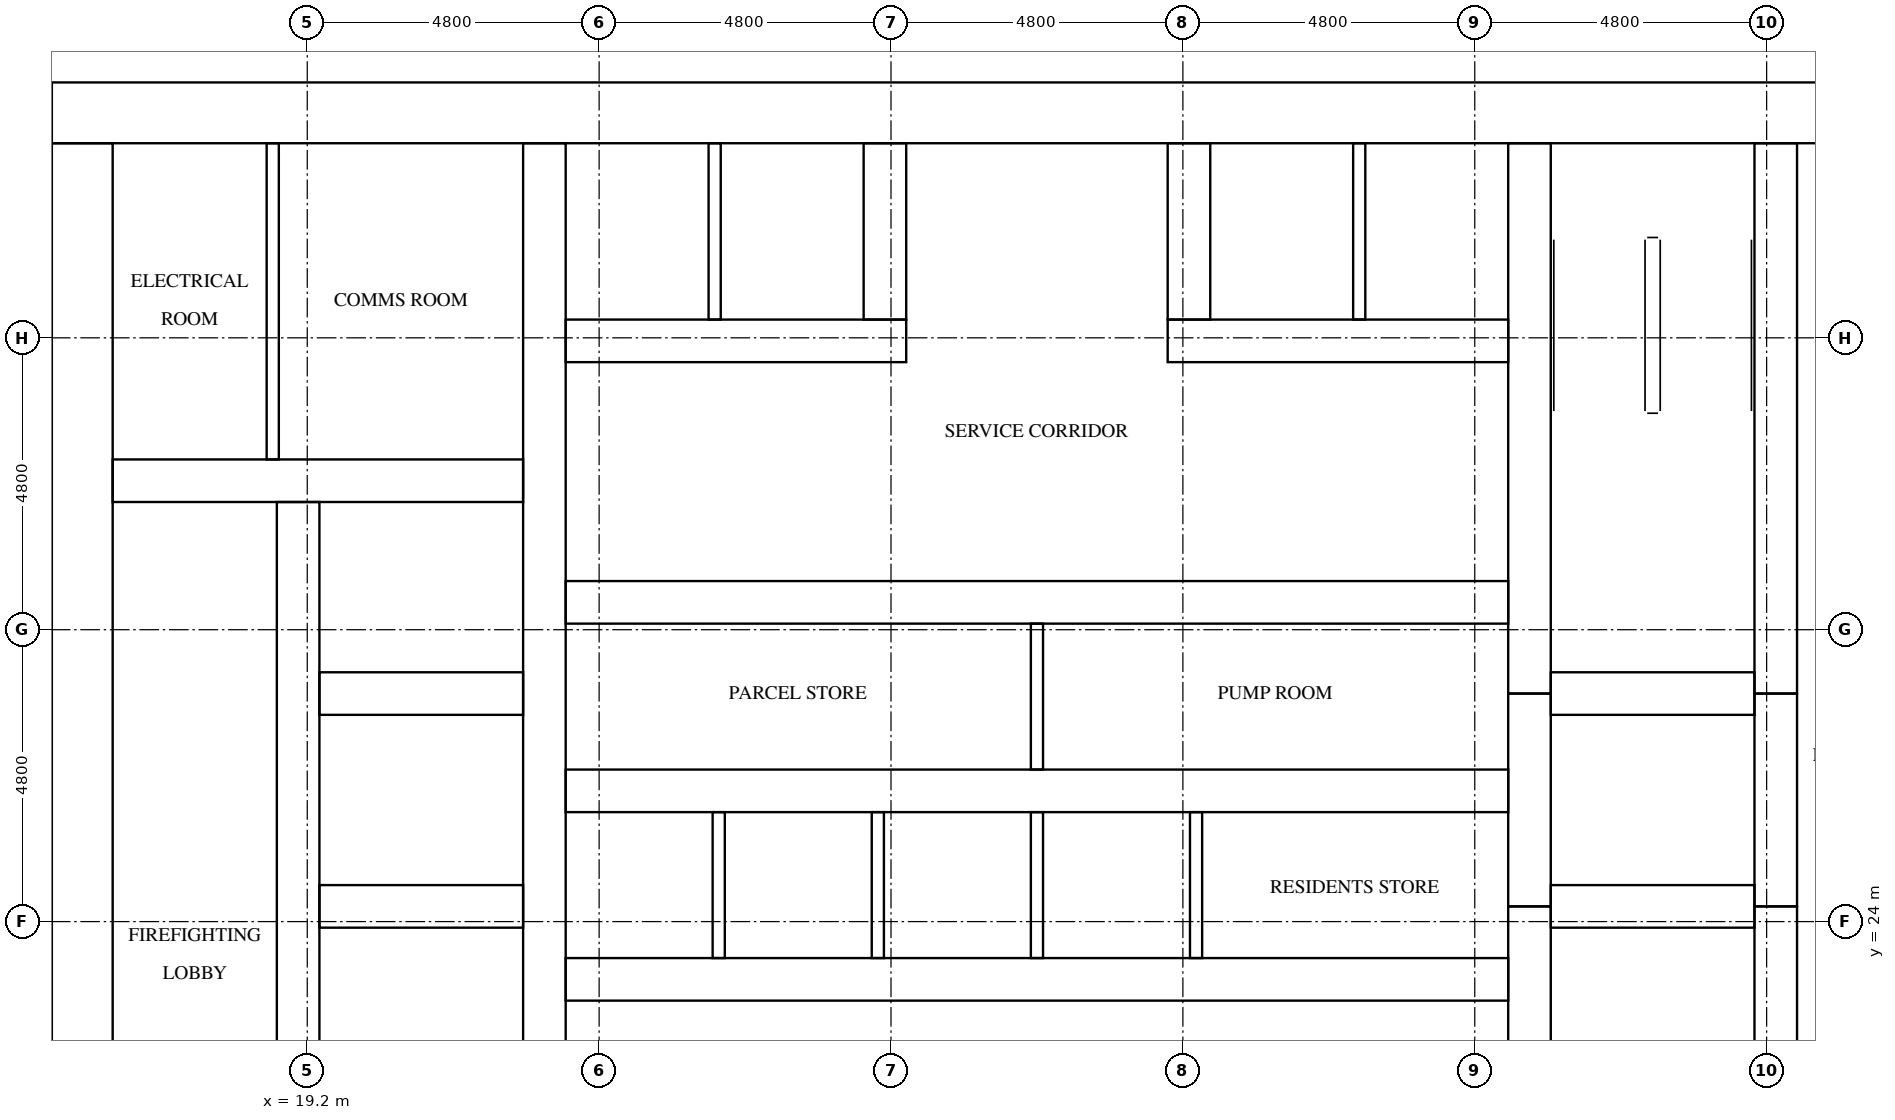
"""IFC4 building model, lengths in metres.
Left out: names, types, materials, properties, quantities, classifications, styles, units other than length and angle.
Written with IfcOpenShell. Run it as: python <this file> out.ifc"""

import sys

from ifc_helpers import new_model, si_unit, direction, frame, frame_2d, origin, place, context, subcontext, project, spatial, rectangle, extrude, element, fill, save


model = new_model("IFC4")
c1 = context("Model", 3, precision=1e-05, world=origin(), true_north=direction((0.0, 1.0)))
c2 = subcontext(c1, "Body", "Model", "MODEL_VIEW")
j1 = project(units=[si_unit("LENGTHUNIT", "METRE"), si_unit("PLANEANGLEUNIT", "RADIAN")], contexts=[c1])
p1 = place(None, origin())
s1 = spatial("IfcSite", under=j1, at=p1, CompositionType="ELEMENT")
p2 = place(p1, origin())
s2 = spatial("IfcBuilding", under=s1, at=p2, CompositionType="ELEMENT")
p3 = place(p2, frame((0.0, 0.0, 50.4)))
s3 = spatial("IfcBuildingStorey", under=s2, at=p3, CompositionType="ELEMENT", Elevation=50.4)
p4 = place(p3, frame((15.0, 37.3, 0.0), z_axis=(0.0, 0.0, 1.0), x_axis=(1.0, 0.0, 0.0)))
e1 = element("IfcWall", 1, at=p4, inside=s3, PredefinedType="SHEAR", context=c2, shape_type="SweptSolid", body=[
    extrude(rectangle(XDim=32.4, YDim=1.0, at=frame_2d((16.2, 0.0))), origin(), (0.0, 0.0, 1.0), 3.1),
])
p5 = place(p4, frame((15.3, 0.0, 0.0)))
e2 = element("IfcOpeningElement", 2, at=p5, cuts=e1, PredefinedType="OPENING", context=c2, shape_type="SweptSolid", body=[
    extrude(rectangle(XDim=1.8, YDim=2.1, at=frame_2d((0.9, 1.05))), frame((0.0, 0.51, 0.0), z_axis=(0.0, -1.0, 0.0), x_axis=(1.0, 0.0, 0.0)), (0.0, 0.0, 1.0), 1.02),
])
p6 = place(p4, frame((1.766, 0.0, 0.0)))
e3 = element("IfcOpeningElement", 3, at=p6, cuts=e1, PredefinedType="OPENING", context=c2, shape_type="SweptSolid", body=[
    extrude(rectangle(XDim=1.0, YDim=2.1, at=frame_2d((0.5, 1.05))), frame((0.0, 0.51, 0.0), z_axis=(0.0, -1.0, 0.0), x_axis=(1.0, 0.0, 0.0)), (0.0, 0.0, 1.0), 1.02),
])
p7 = place(p4, frame((5.241, 0.0, 0.0)))
e4 = element("IfcOpeningElement", 4, at=p7, cuts=e1, PredefinedType="OPENING", context=c2, shape_type="SweptSolid", body=[
    extrude(rectangle(XDim=1.0, YDim=2.1, at=frame_2d((0.5, 1.05))), frame((0.0, 0.51, 0.0), z_axis=(0.0, -1.0, 0.0), x_axis=(1.0, 0.0, 0.0)), (0.0, 0.0, 1.0), 1.02),
])
p8 = place(p3, frame((15.5, 16.0, 0.0), z_axis=(0.0, 0.0, 1.0), x_axis=(0.0, 1.0, 0.0)))
e5 = element("IfcWall", 5, at=p8, inside=s3, PredefinedType="SHEAR", context=c2, shape_type="SweptSolid", body=[
    extrude(rectangle(XDim=20.8, YDim=1.0, at=frame_2d((10.4, 0.0))), origin(), (0.0, 0.0, 1.0), 3.1),
])
p9 = place(p8, frame((4.76, 0.0, 0.0)))
e6 = element("IfcOpeningElement", 6, at=p9, cuts=e5, PredefinedType="OPENING", context=c2, shape_type="SweptSolid", body=[
    extrude(rectangle(XDim=1.2, YDim=2.1, at=frame_2d((0.6, 1.05))), frame((0.0, 0.51, 0.0), z_axis=(0.0, -1.0, 0.0), x_axis=(1.0, 0.0, 0.0)), (0.0, 0.0, 1.0), 1.02),
])
p10 = place(p3, frame((19.05, 16.0, 0.0), z_axis=(0.0, 0.0, 1.0), x_axis=(0.0, 1.0, 0.0)))
e7 = element("IfcWall", 7, at=p10, inside=s3, PredefinedType="SHEAR", context=c2, shape_type="SweptSolid", body=[
    extrude(rectangle(XDim=14.9, YDim=0.7, at=frame_2d((7.45, 0.0))), origin(), (0.0, 0.0, 1.0), 3.1),
])
p11 = place(p10, frame((9.45, 0.0, 0.0)))
e8 = element("IfcOpeningElement", 8, at=p11, cuts=e7, PredefinedType="OPENING", context=c2, shape_type="SweptSolid", body=[
    extrude(rectangle(XDim=1.1, YDim=2.1, at=frame_2d((0.55, 1.05))), frame((0.0, 0.36, 0.0), z_axis=(0.0, -1.0, 0.0), x_axis=(1.0, 0.0, 0.0)), (0.0, 0.0, 1.0), 0.72),
])
p12 = place(p10, frame((12.95, 0.0, 0.0)))
e9 = element("IfcOpeningElement", 9, at=p12, cuts=e7, PredefinedType="OPENING", context=c2, shape_type="SweptSolid", body=[
    extrude(rectangle(XDim=1.1, YDim=2.1, at=frame_2d((0.55, 1.05))), frame((0.0, 0.36, 0.0), z_axis=(0.0, -1.0, 0.0), x_axis=(1.0, 0.0, 0.0)), (0.0, 0.0, 1.0), 0.72),
])
p13 = place(p10, frame((0.2, 0.0, 0.0)))
e10 = element("IfcOpeningElement", 10, at=p13, cuts=e7, PredefinedType="OPENING", context=c2, shape_type="SweptSolid", body=[
    extrude(rectangle(XDim=1.2, YDim=2.1, at=frame_2d((0.6, 1.05))), frame((0.0, 0.36, 0.0), z_axis=(0.0, -1.0, 0.0), x_axis=(1.0, 0.0, 0.0)), (0.0, 0.0, 1.0), 0.72),
])
p14 = place(p3, frame((23.1, 16.0, 0.0), z_axis=(0.0, 0.0, 1.0), x_axis=(0.0, 1.0, 0.0)))
e11 = element("IfcWall", 11, at=p14, inside=s3, PredefinedType="SHEAR", context=c2, shape_type="SweptSolid", body=[
    extrude(rectangle(XDim=20.8, YDim=0.7, at=frame_2d((10.4, 0.0))), origin(), (0.0, 0.0, 1.0), 3.1),
])
p15 = place(p3, frame((39.3, 16.0, 0.0), z_axis=(0.0, 0.0, 1.0), x_axis=(0.0, 1.0, 0.0)))
e12 = element("IfcWall", 12, at=p15, inside=s3, PredefinedType="SHEAR", context=c2, shape_type="SweptSolid", body=[
    extrude(rectangle(XDim=8.25, YDim=0.7, at=frame_2d((4.125, 0.0))), origin(), (0.0, 0.0, 1.0), 3.1),
])
p16 = place(p3, frame((39.3, 24.25, 0.0), z_axis=(0.0, 0.0, 1.0), x_axis=(0.0, 1.0, 0.0)))
e13 = element("IfcWall", 13, at=p16, inside=s3, PredefinedType="SHEAR", context=c2, shape_type="SweptSolid", body=[
    extrude(rectangle(XDim=3.5, YDim=0.7, at=frame_2d((1.75, 0.0))), origin(), (0.0, 0.0, 1.0), 3.1),
])
p17 = place(p3, frame((39.3, 27.75, 0.0), z_axis=(0.0, 0.0, 1.0), x_axis=(0.0, 1.0, 0.0)))
e14 = element("IfcWall", 14, at=p17, inside=s3, PredefinedType="SHEAR", context=c2, shape_type="SweptSolid", body=[
    extrude(rectangle(XDim=9.05, YDim=0.7, at=frame_2d((4.525, 0.0))), origin(), (0.0, 0.0, 1.0), 3.1),
])
p18 = place(p3, frame((43.35, 16.0, 0.0), z_axis=(0.0, 0.0, 1.0), x_axis=(0.0, 1.0, 0.0)))
e15 = element("IfcWall", 15, at=p18, inside=s3, PredefinedType="SHEAR", context=c2, shape_type="SweptSolid", body=[
    extrude(rectangle(XDim=8.25, YDim=0.7, at=frame_2d((4.125, 0.0))), origin(), (0.0, 0.0, 1.0), 3.1),
])
p19 = place(p18, frame((0.2, 0.0, 0.0)))
e16 = element("IfcOpeningElement", 16, at=p19, cuts=e15, PredefinedType="OPENING", context=c2, shape_type="SweptSolid", body=[
    extrude(rectangle(XDim=1.2, YDim=2.1, at=frame_2d((0.6, 1.05))), frame((0.0, 0.36, 0.0), z_axis=(0.0, -1.0, 0.0), x_axis=(1.0, 0.0, 0.0)), (0.0, 0.0, 1.0), 0.72),
])
p20 = place(p3, frame((43.35, 24.25, 0.0), z_axis=(0.0, 0.0, 1.0), x_axis=(0.0, 1.0, 0.0)))
e17 = element("IfcWall", 17, at=p20, inside=s3, PredefinedType="SHEAR", context=c2, shape_type="SweptSolid", body=[
    extrude(rectangle(XDim=3.5, YDim=0.7, at=frame_2d((1.75, 0.0))), origin(), (0.0, 0.0, 1.0), 3.1),
])
p21 = place(p20, frame((1.2, 0.0, 0.0)))
e18 = element("IfcOpeningElement", 18, at=p21, cuts=e17, PredefinedType="OPENING", context=c2, shape_type="SweptSolid", body=[
    extrude(rectangle(XDim=1.1, YDim=2.1, at=frame_2d((0.55, 1.05))), frame((0.0, 0.36, 0.0), z_axis=(0.0, -1.0, 0.0), x_axis=(1.0, 0.0, 0.0)), (0.0, 0.0, 1.0), 0.72),
])
p22 = place(p3, frame((43.35, 27.75, 0.0), z_axis=(0.0, 0.0, 1.0), x_axis=(0.0, 1.0, 0.0)))
e19 = element("IfcWall", 19, at=p22, inside=s3, PredefinedType="SHEAR", context=c2, shape_type="SweptSolid", body=[
    extrude(rectangle(XDim=9.05, YDim=0.7, at=frame_2d((4.525, 0.0))), origin(), (0.0, 0.0, 1.0), 3.1),
])
p23 = place(p22, frame((7.65, 0.0, 0.0)))
e20 = element("IfcOpeningElement", 20, at=p23, cuts=e19, PredefinedType="OPENING", context=c2, shape_type="SweptSolid", body=[
    extrude(rectangle(XDim=1.2, YDim=2.1, at=frame_2d((0.6, 1.05))), frame((0.0, 0.36, 0.0), z_axis=(0.0, -1.0, 0.0), x_axis=(1.0, 0.0, 0.0)), (0.0, 0.0, 1.0), 0.72),
])
for number, where, z_axis, x_axis in (
    (21, (19.4, 24.25, 0.0), (0.0, 0.0, 1.0), (1.0, 0.0, 0.0)),
    (22, (19.4, 27.75, 0.0), (0.0, 0.0, 1.0), (1.0, 0.0, 0.0)),
):
    element("IfcWall", number, at=place(p3, frame(where, z_axis=z_axis, x_axis=x_axis)), inside=s3, PredefinedType="SHEAR", context=c2, shape_type="SweptSolid", body=[
        extrude(rectangle(XDim=3.35, YDim=0.7, at=frame_2d((1.675, 0.0))), origin(), (0.0, 0.0, 1.0), 3.1),
    ])
p24 = place(p3, frame((16.0, 31.25, 0.0), z_axis=(0.0, 0.0, 1.0), x_axis=(1.0, 0.0, 0.0)))
e23 = element("IfcWall", 23, at=p24, inside=s3, PredefinedType="SHEAR", context=c2, shape_type="SweptSolid", body=[
    extrude(rectangle(XDim=6.75, YDim=0.7, at=frame_2d((3.375, 0.0))), origin(), (0.0, 0.0, 1.0), 3.1),
])
for number, where, z_axis, x_axis in (
    (24, (39.65, 24.25, 0.0), (0.0, 0.0, 1.0), (1.0, 0.0, 0.0)),
    (25, (39.65, 27.75, 0.0), (0.0, 0.0, 1.0), (1.0, 0.0, 0.0)),
):
    element("IfcWall", number, at=place(p3, frame(where, z_axis=z_axis, x_axis=x_axis)), inside=s3, PredefinedType="SHEAR", context=c2, shape_type="SweptSolid", body=[
        extrude(rectangle(XDim=3.35, YDim=0.7, at=frame_2d((1.675, 0.0))), origin(), (0.0, 0.0, 1.0), 3.1),
    ])
p25 = place(p3, frame((23.45, 23.05, 0.0), z_axis=(0.0, 0.0, 1.0), x_axis=(1.0, 0.0, 0.0)))
e26 = element("IfcWall", 26, at=p25, inside=s3, PredefinedType="SHEAR", context=c2, shape_type="SweptSolid", body=[
    extrude(rectangle(XDim=15.5, YDim=0.7, at=frame_2d((7.75, 0.0))), origin(), (0.0, 0.0, 1.0), 3.1),
])
p26 = place(p25, frame((0.658, 0.0, 0.0)))
e27 = element("IfcOpeningElement", 27, at=p26, cuts=e26, PredefinedType="OPENING", context=c2, shape_type="SweptSolid", body=[
    extrude(rectangle(XDim=1.1, YDim=2.1, at=frame_2d((0.55, 1.05))), frame((0.0, 0.36, 0.0), z_axis=(0.0, -1.0, 0.0), x_axis=(1.0, 0.0, 0.0)), (0.0, 0.0, 1.0), 0.72),
])
p27 = place(p25, frame((3.275, 0.0, 0.0)))
e28 = element("IfcOpeningElement", 28, at=p27, cuts=e26, PredefinedType="OPENING", context=c2, shape_type="SweptSolid", body=[
    extrude(rectangle(XDim=1.1, YDim=2.1, at=frame_2d((0.55, 1.05))), frame((0.0, 0.36, 0.0), z_axis=(0.0, -1.0, 0.0), x_axis=(1.0, 0.0, 0.0)), (0.0, 0.0, 1.0), 0.72),
])
p28 = place(p25, frame((12.483, 0.0, 0.0)))
e29 = element("IfcOpeningElement", 29, at=p28, cuts=e26, PredefinedType="OPENING", context=c2, shape_type="SweptSolid", body=[
    extrude(rectangle(XDim=1.0, YDim=2.1, at=frame_2d((0.5, 1.05))), frame((0.0, 0.36, 0.0), z_axis=(0.0, -1.0, 0.0), x_axis=(1.0, 0.0, 0.0)), (0.0, 0.0, 1.0), 0.72),
])
p29 = place(p3, frame((23.45, 26.15, 0.0), z_axis=(0.0, 0.0, 1.0), x_axis=(1.0, 0.0, 0.0)))
e30 = element("IfcWall", 30, at=p29, inside=s3, PredefinedType="SHEAR", context=c2, shape_type="SweptSolid", body=[
    extrude(rectangle(XDim=15.5, YDim=0.7, at=frame_2d((7.75, 0.0))), origin(), (0.0, 0.0, 1.0), 3.1),
])
p30 = place(p3, frame((23.45, 29.25, 0.0), z_axis=(0.0, 0.0, 1.0), x_axis=(1.0, 0.0, 0.0)))
e31 = element("IfcWall", 31, at=p30, inside=s3, PredefinedType="SHEAR", context=c2, shape_type="SweptSolid", body=[
    extrude(rectangle(XDim=15.5, YDim=0.7, at=frame_2d((7.75, 0.0))), origin(), (0.0, 0.0, 1.0), 3.1),
])
p31 = place(p30, frame((3.325, 0.0, 0.0)))
e32 = element("IfcOpeningElement", 32, at=p31, cuts=e31, PredefinedType="OPENING", context=c2, shape_type="SweptSolid", body=[
    extrude(rectangle(XDim=1.0, YDim=2.1, at=frame_2d((0.5, 1.05))), frame((0.0, 0.36, 0.0), z_axis=(0.0, -1.0, 0.0), x_axis=(1.0, 0.0, 0.0)), (0.0, 0.0, 1.0), 0.72),
])
p32 = place(p30, frame((11.175, 0.0, 0.0)))
e33 = element("IfcOpeningElement", 33, at=p32, cuts=e31, PredefinedType="OPENING", context=c2, shape_type="SweptSolid", body=[
    extrude(rectangle(XDim=1.0, YDim=2.1, at=frame_2d((0.5, 1.05))), frame((0.0, 0.36, 0.0), z_axis=(0.0, -1.0, 0.0), x_axis=(1.0, 0.0, 0.0)), (0.0, 0.0, 1.0), 0.72),
])
p33 = place(p3, frame((23.45, 33.55, 0.0), z_axis=(0.0, 0.0, 1.0), x_axis=(1.0, 0.0, 0.0)))
e34 = element("IfcWall", 34, at=p33, inside=s3, PredefinedType="SHEAR", context=c2, shape_type="SweptSolid", body=[
    extrude(rectangle(XDim=5.6, YDim=0.7, at=frame_2d((2.8, 0.0))), origin(), (0.0, 0.0, 1.0), 3.1),
])
p34 = place(p3, frame((33.35, 33.55, 0.0), z_axis=(0.0, 0.0, 1.0), x_axis=(1.0, 0.0, 0.0)))
e35 = element("IfcWall", 35, at=p34, inside=s3, PredefinedType="SHEAR", context=c2, shape_type="SweptSolid", body=[
    extrude(rectangle(XDim=5.6, YDim=0.7, at=frame_2d((2.8, 0.0))), origin(), (0.0, 0.0, 1.0), 3.1),
])
for number, where, z_axis, x_axis in (
    (36, (28.7, 33.9, 0.0), (0.0, 0.0, 1.0), (0.0, 1.0, 0.0)),
    (37, (33.7, 33.9, 0.0), (0.0, 0.0, 1.0), (0.0, 1.0, 0.0)),
):
    element("IfcWall", number, at=place(p3, frame(where, z_axis=z_axis, x_axis=x_axis)), inside=s3, PredefinedType="SHEAR", context=c2, shape_type="SweptSolid", body=[
        extrude(rectangle(XDim=2.9, YDim=0.7, at=frame_2d((1.45, 0.0))), origin(), (0.0, 0.0, 1.0), 3.1),
    ])
for number, where, z_axis, x_axis in (
    (38, (25.967, 23.4, 0.0), (0.0, 0.0, 1.0), (0.0, 1.0, 0.0)),
    (39, (28.583, 23.4, 0.0), (0.0, 0.0, 1.0), (0.0, 1.0, 0.0)),
    (40, (31.2, 23.4, 0.0), (0.0, 0.0, 1.0), (0.0, 1.0, 0.0)),
    (41, (33.817, 23.4, 0.0), (0.0, 0.0, 1.0), (0.0, 1.0, 0.0)),
):
    element("IfcWall", number, at=place(p3, frame(where, z_axis=z_axis, x_axis=x_axis)), inside=s3, PredefinedType="SOLIDWALL", context=c2, shape_type="SweptSolid", body=[
        extrude(rectangle(XDim=2.4, YDim=0.2, at=frame_2d((1.2, 0.0))), origin(), (0.0, 0.0, 1.0), 3.1),
    ])
for number, where, z_axis, x_axis in (
    (42, (25.9, 33.9, 0.0), (0.0, 0.0, 1.0), (0.0, 1.0, 0.0)),
    (43, (36.5, 33.9, 0.0), (0.0, 0.0, 1.0), (0.0, 1.0, 0.0)),
):
    element("IfcWall", number, at=place(p3, frame(where, z_axis=z_axis, x_axis=x_axis)), inside=s3, PredefinedType="SOLIDWALL", context=c2, shape_type="SweptSolid", body=[
        extrude(rectangle(XDim=2.9, YDim=0.2, at=frame_2d((1.45, 0.0))), origin(), (0.0, 0.0, 1.0), 3.1),
    ])
p35 = place(p3, frame((18.633, 31.6, 0.0), z_axis=(0.0, 0.0, 1.0), x_axis=(0.0, 1.0, 0.0)))
e44 = element("IfcWall", 44, at=p35, inside=s3, PredefinedType="PARTITIONING", context=c2, shape_type="SweptSolid", body=[
    extrude(rectangle(XDim=5.2, YDim=0.2, at=frame_2d((2.6, 0.0))), origin(), (0.0, 0.0, 1.0), 3.1),
])
p36 = place(p3, frame((31.2, 26.5, 0.0), z_axis=(0.0, 0.0, 1.0), x_axis=(0.0, 1.0, 0.0)))
e45 = element("IfcWall", 45, at=p36, inside=s3, PredefinedType="PARTITIONING", context=c2, shape_type="SweptSolid", body=[
    extrude(rectangle(XDim=2.4, YDim=0.2, at=frame_2d((1.2, 0.0))), origin(), (0.0, 0.0, 1.0), 3.1),
])
p37 = place(p26, origin())
e46 = element("IfcDoor", 46, at=p37, inside=s3, OperationType="DOUBLE_DOOR_SLIDING", PredefinedType="DOOR", context=c2, shape_type="SweptSolid", body=[
    extrude(rectangle(XDim=1.1, YDim=2.1, at=frame_2d((0.55, 1.05))), frame((0.0, 0.025, 0.0), z_axis=(0.0, -1.0, 0.0), x_axis=(1.0, 0.0, 0.0)), (0.0, 0.0, 1.0), 0.05),
])
fill(e27, e46)
p38 = place(p27, origin())
e47 = element("IfcDoor", 47, at=p38, inside=s3, OperationType="DOUBLE_DOOR_SLIDING", PredefinedType="DOOR", context=c2, shape_type="SweptSolid", body=[
    extrude(rectangle(XDim=1.1, YDim=2.1, at=frame_2d((0.55, 1.05))), frame((0.0, 0.025, 0.0), z_axis=(0.0, -1.0, 0.0), x_axis=(1.0, 0.0, 0.0)), (0.0, 0.0, 1.0), 0.05),
])
fill(e28, e47)
p39 = place(p11, origin())
e48 = element("IfcDoor", 48, at=p39, inside=s3, OperationType="DOUBLE_DOOR_SLIDING", PredefinedType="DOOR", context=c2, shape_type="SweptSolid", body=[
    extrude(rectangle(XDim=1.1, YDim=2.1, at=frame_2d((0.55, 1.05))), frame((0.0, 0.025, 0.0), z_axis=(0.0, -1.0, 0.0), x_axis=(1.0, 0.0, 0.0)), (0.0, 0.0, 1.0), 0.05),
])
fill(e8, e48)
p40 = place(p12, origin())
e49 = element("IfcDoor", 49, at=p40, inside=s3, OperationType="DOUBLE_DOOR_SLIDING", PredefinedType="DOOR", context=c2, shape_type="SweptSolid", body=[
    extrude(rectangle(XDim=1.1, YDim=2.1, at=frame_2d((0.55, 1.05))), frame((0.0, 0.025, 0.0), z_axis=(0.0, -1.0, 0.0), x_axis=(1.0, 0.0, 0.0)), (0.0, 0.0, 1.0), 0.05),
])
fill(e9, e49)
p41 = place(p21, origin())
e50 = element("IfcDoor", 50, at=p41, inside=s3, OperationType="DOUBLE_DOOR_SLIDING", PredefinedType="DOOR", context=c2, shape_type="SweptSolid", body=[
    extrude(rectangle(XDim=1.1, YDim=2.1, at=frame_2d((0.55, 1.05))), frame((0.0, 0.025, 0.0), z_axis=(0.0, -1.0, 0.0), x_axis=(1.0, 0.0, 0.0)), (0.0, 0.0, 1.0), 0.05),
])
fill(e18, e50)
p42 = place(p23, origin())
e51 = element("IfcDoor", 51, at=p42, inside=s3, OperationType="SINGLE_SWING_RIGHT", PredefinedType="DOOR", context=c2, shape_type="SweptSolid", body=[
    extrude(rectangle(XDim=1.2, YDim=2.1, at=frame_2d((0.6, 1.05))), frame((0.0, 0.025, 0.0), z_axis=(0.0, -1.0, 0.0), x_axis=(1.0, 0.0, 0.0)), (0.0, 0.0, 1.0), 0.05),
])
fill(e20, e51)
p43 = place(p5, origin())
e52 = element("IfcDoor", 52, at=p43, inside=s3, OperationType="DOUBLE_DOOR_SINGLE_SWING", PredefinedType="DOOR", context=c2, shape_type="SweptSolid", body=[
    extrude(rectangle(XDim=1.8, YDim=2.1, at=frame_2d((0.9, 1.05))), frame((0.0, 0.025, 0.0), z_axis=(0.0, -1.0, 0.0), x_axis=(1.0, 0.0, 0.0)), (0.0, 0.0, 1.0), 0.05),
])
fill(e2, e52)
p44 = place(p6, origin())
e53 = element("IfcDoor", 53, at=p44, inside=s3, OperationType="SINGLE_SWING_LEFT", PredefinedType="DOOR", context=c2, shape_type="SweptSolid", body=[
    extrude(rectangle(XDim=1.0, YDim=2.1, at=frame_2d((0.5, 1.05))), frame((0.0, 0.025, 0.0), z_axis=(0.0, -1.0, 0.0), x_axis=(1.0, 0.0, 0.0)), (0.0, 0.0, 1.0), 0.05),
])
fill(e3, e53)
p45 = place(p7, origin())
e54 = element("IfcDoor", 54, at=p45, inside=s3, OperationType="SINGLE_SWING_RIGHT", PredefinedType="DOOR", context=c2, shape_type="SweptSolid", body=[
    extrude(rectangle(XDim=1.0, YDim=2.1, at=frame_2d((0.5, 1.05))), frame((0.0, 0.025, 0.0), z_axis=(0.0, -1.0, 0.0), x_axis=(1.0, 0.0, 0.0)), (0.0, 0.0, 1.0), 0.05),
])
fill(e4, e54)
p46 = place(p28, frame((1.0, 0.0, 0.0), z_axis=(0.0, 0.0, 1.0), x_axis=(-1.0, 0.0, 0.0)))
e55 = element("IfcDoor", 55, at=p46, inside=s3, OperationType="SINGLE_SWING_LEFT", PredefinedType="DOOR", context=c2, shape_type="SweptSolid", body=[
    extrude(rectangle(XDim=1.0, YDim=2.1, at=frame_2d((0.5, 1.05))), frame((0.0, 0.025, 0.0), z_axis=(0.0, -1.0, 0.0), x_axis=(1.0, 0.0, 0.0)), (0.0, 0.0, 1.0), 0.05),
])
fill(e29, e55)
p47 = place(p31, origin())
e56 = element("IfcDoor", 56, at=p47, inside=s3, OperationType="SINGLE_SWING_RIGHT", PredefinedType="DOOR", context=c2, shape_type="SweptSolid", body=[
    extrude(rectangle(XDim=1.0, YDim=2.1, at=frame_2d((0.5, 1.05))), frame((0.0, 0.025, 0.0), z_axis=(0.0, -1.0, 0.0), x_axis=(1.0, 0.0, 0.0)), (0.0, 0.0, 1.0), 0.05),
])
fill(e32, e56)
p48 = place(p32, origin())
e57 = element("IfcDoor", 57, at=p48, inside=s3, OperationType="SINGLE_SWING_LEFT", PredefinedType="DOOR", context=c2, shape_type="SweptSolid", body=[
    extrude(rectangle(XDim=1.0, YDim=2.1, at=frame_2d((0.5, 1.05))), frame((0.0, 0.025, 0.0), z_axis=(0.0, -1.0, 0.0), x_axis=(1.0, 0.0, 0.0)), (0.0, 0.0, 1.0), 0.05),
])
fill(e33, e57)
save(model, sys.argv[1])
